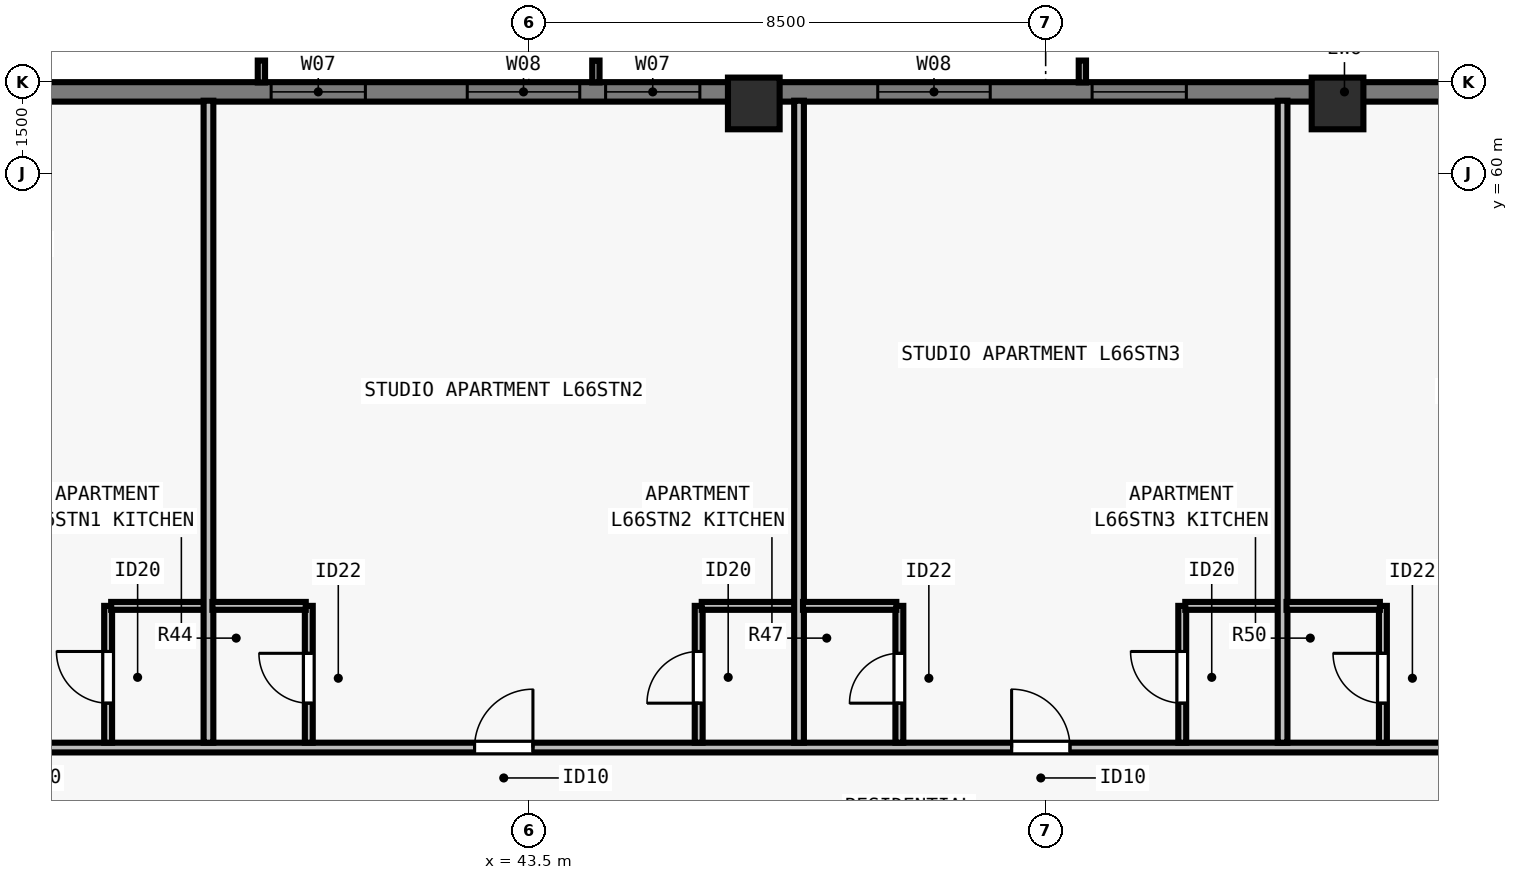
"""IFC4 building model, lengths in metres.
Left out: names, types, materials, properties, quantities, classifications, styles, units other than length and angle.
Written with IfcOpenShell. Run it as: python <this file> out.ifc"""

import sys

from ifc_helpers import new_model, si_unit, direction, frame, frame_2d, origin, origin_2d, place, context, subcontext, project, spatial, rectangle, extrude, element, fill, save


model = new_model("IFC4")
c1 = context("Model", 3, precision=1e-05, world=origin(), true_north=direction((0.0, 1.0)))
c2 = subcontext(c1, "Body", "Model", "MODEL_VIEW")
j1 = project(units=[si_unit("LENGTHUNIT", "METRE"), si_unit("PLANEANGLEUNIT", "RADIAN")], contexts=[c1])
p1 = place(None, origin())
s1 = spatial("IfcSite", under=j1, at=p1, CompositionType="ELEMENT")
p2 = place(p1, origin())
s2 = spatial("IfcBuilding", under=s1, at=p2, CompositionType="ELEMENT")
p3 = place(p2, frame((0.0, 0.0, 241.0)))
s3 = spatial("IfcBuildingStorey", under=s2, at=p3, CompositionType="ELEMENT", Elevation=241.0)
for number, where, z_axis, x_axis in (
    (1, (56.8, 61.15, 0.0), (0.0, 0.0, 1.0), (1.0, 0.0, 0.0)),
    (2, (47.2, 61.15, 0.0), (0.0, 0.0, 1.0), (1.0, 0.0, 0.0)),
):
    element("IfcColumn", number, at=place(p3, frame(where, z_axis=z_axis, x_axis=x_axis)), inside=s3, PredefinedType="COLUMN", context=c2, shape_type="SweptSolid", body=[
        extrude(rectangle(XDim=0.85, YDim=0.85, at=origin_2d()), origin(), (0.0, 0.0, 1.0), 3.5),
    ])
p4 = place(p3, frame((34.5, 61.34, 0.0), z_axis=(0.0, 0.0, 1.0), x_axis=(1.0, 0.0, 0.0)))
e3 = element("IfcWall", 3, at=p4, inside=s3, PredefinedType="SOLIDWALL", context=c2, shape_type="SweptSolid", body=[
    extrude(rectangle(XDim=34.702, YDim=0.32, at=frame_2d((17.351, 0.0))), origin(), (0.0, 0.0, 1.0), 3.29),
])
p5 = place(p4, frame((4.763, 0.0, 0.8)))
e4 = element("IfcOpeningElement", 4, at=p5, cuts=e3, PredefinedType="OPENING", context=c2, shape_type="SweptSolid", body=[
    extrude(rectangle(XDim=1.55, YDim=1.678, at=frame_2d((0.775, 0.839))), frame((0.0, 0.17, 0.0), z_axis=(0.0, -1.0, 0.0), x_axis=(1.0, 0.0, 0.0)), (0.0, 0.0, 1.0), 0.34),
])
p6 = place(p4, frame((7.988, 0.0, 0.8)))
e5 = element("IfcOpeningElement", 5, at=p6, cuts=e3, PredefinedType="OPENING", context=c2, shape_type="SweptSolid", body=[
    extrude(rectangle(XDim=1.85, YDim=1.678, at=frame_2d((0.925, 0.839))), frame((0.0, 0.17, 0.0), z_axis=(0.0, -1.0, 0.0), x_axis=(1.0, 0.0, 0.0)), (0.0, 0.0, 1.0), 0.34),
])
p7 = place(p4, frame((10.263, 0.0, 0.8)))
e6 = element("IfcOpeningElement", 6, at=p7, cuts=e3, PredefinedType="OPENING", context=c2, shape_type="SweptSolid", body=[
    extrude(rectangle(XDim=1.55, YDim=1.678, at=frame_2d((0.775, 0.839))), frame((0.0, 0.17, 0.0), z_axis=(0.0, -1.0, 0.0), x_axis=(1.0, 0.0, 0.0)), (0.0, 0.0, 1.0), 0.34),
])
p8 = place(p4, frame((14.738, 0.0, 0.8)))
e7 = element("IfcOpeningElement", 7, at=p8, cuts=e3, PredefinedType="OPENING", context=c2, shape_type="SweptSolid", body=[
    extrude(rectangle(XDim=1.85, YDim=1.678, at=frame_2d((0.925, 0.839))), frame((0.0, 0.17, 0.0), z_axis=(0.0, -1.0, 0.0), x_axis=(1.0, 0.0, 0.0)), (0.0, 0.0, 1.0), 0.34),
])
p9 = place(p4, frame((18.264, 0.0, 0.8)))
e8 = element("IfcOpeningElement", 8, at=p9, cuts=e3, PredefinedType="OPENING", context=c2, shape_type="SweptSolid", body=[
    extrude(rectangle(XDim=1.55, YDim=1.678, at=frame_2d((0.775, 0.839))), frame((0.0, 0.17, 0.0), z_axis=(0.0, -1.0, 0.0), x_axis=(1.0, 0.0, 0.0)), (0.0, 0.0, 1.0), 0.34),
])
p10 = place(p4, frame((25.014, 0.0, 0.8)))
e9 = element("IfcOpeningElement", 9, at=p10, cuts=e3, PredefinedType="OPENING", context=c2, shape_type="SweptSolid", body=[
    extrude(rectangle(XDim=1.55, YDim=1.678, at=frame_2d((0.775, 0.839))), frame((0.0, 0.17, 0.0), z_axis=(0.0, -1.0, 0.0), x_axis=(1.0, 0.0, 0.0)), (0.0, 0.0, 1.0), 0.34),
])
p11 = place(p4, frame((28.24, 0.0, 0.8)))
e10 = element("IfcOpeningElement", 10, at=p11, cuts=e3, PredefinedType="OPENING", context=c2, shape_type="SweptSolid", body=[
    extrude(rectangle(XDim=1.85, YDim=1.678, at=frame_2d((0.925, 0.839))), frame((0.0, 0.17, 0.0), z_axis=(0.0, -1.0, 0.0), x_axis=(1.0, 0.0, 0.0)), (0.0, 0.0, 1.0), 0.34),
])
p12 = place(p3, frame((29.805, 50.558, 0.0), z_axis=(0.0, 0.0, 1.0), x_axis=(1.0, 0.0, 0.0)))
e11 = element("IfcWall", 11, at=p12, inside=s3, PredefinedType="PARTITIONING", context=c2, shape_type="SweptSolid", body=[
    extrude(rectangle(XDim=44.39, YDim=0.16, at=frame_2d((22.195, 0.0))), origin(), (0.0, 0.0, 1.0), 2.958),
])
p13 = place(p12, frame((3.791, 0.0, 0.0)))
e12 = element("IfcOpeningElement", 12, at=p13, cuts=e11, PredefinedType="OPENING", context=c2, shape_type="SweptSolid", body=[
    extrude(rectangle(XDim=0.96, YDim=2.18, at=frame_2d((0.48, 1.09))), frame((0.0, 0.09, 0.0), z_axis=(0.0, -1.0, 0.0), x_axis=(1.0, 0.0, 0.0)), (0.0, 0.0, 1.0), 0.18),
])
p14 = place(p12, frame((12.803, 0.0, 0.0)))
e13 = element("IfcOpeningElement", 13, at=p14, cuts=e11, PredefinedType="OPENING", context=c2, shape_type="SweptSolid", body=[
    extrude(rectangle(XDim=0.96, YDim=2.18, at=frame_2d((0.48, 1.09))), frame((0.0, 0.09, 0.0), z_axis=(0.0, -1.0, 0.0), x_axis=(1.0, 0.0, 0.0)), (0.0, 0.0, 1.0), 0.18),
])
p15 = place(p12, frame((21.635, 0.0, 0.0)))
e14 = element("IfcOpeningElement", 14, at=p15, cuts=e11, PredefinedType="OPENING", context=c2, shape_type="SweptSolid", body=[
    extrude(rectangle(XDim=0.96, YDim=2.18, at=frame_2d((0.48, 1.09))), frame((0.0, 0.09, 0.0), z_axis=(0.0, -1.0, 0.0), x_axis=(1.0, 0.0, 0.0)), (0.0, 0.0, 1.0), 0.18),
])
p16 = place(p12, frame((30.467, 0.0, 0.0)))
e15 = element("IfcOpeningElement", 15, at=p16, cuts=e11, PredefinedType="OPENING", context=c2, shape_type="SweptSolid", body=[
    extrude(rectangle(XDim=0.96, YDim=2.18, at=frame_2d((0.48, 1.09))), frame((0.0, 0.09, 0.0), z_axis=(0.0, -1.0, 0.0), x_axis=(1.0, 0.0, 0.0)), (0.0, 0.0, 1.0), 0.18),
])
p17 = place(p12, frame((39.559, 0.0, 0.0)))
e16 = element("IfcOpeningElement", 16, at=p17, cuts=e11, PredefinedType="OPENING", context=c2, shape_type="SweptSolid", body=[
    extrude(rectangle(XDim=0.96, YDim=2.18, at=frame_2d((0.48, 1.09))), frame((0.0, 0.09, 0.0), z_axis=(0.0, -1.0, 0.0), x_axis=(1.0, 0.0, 0.0)), (0.0, 0.0, 1.0), 0.18),
])
p18 = place(p3, frame((36.582, 50.637, 0.0), z_axis=(0.0, 0.0, 1.0), x_axis=(0.0, 1.0, 0.0)))
e17 = element("IfcWall", 17, at=p18, inside=s3, PredefinedType="PLUMBINGWALL", context=c2, shape_type="SweptSolid", body=[
    extrude(rectangle(XDim=2.25, YDim=0.13, at=frame_2d((1.125, 0.0))), origin(), (0.0, 0.0, 1.0), 3.29),
])
p19 = place(p18, frame((0.65, 0.0, 0.0)))
e18 = element("IfcOpeningElement", 18, at=p19, cuts=e17, PredefinedType="OPENING", context=c2, shape_type="SweptSolid", body=[
    extrude(rectangle(XDim=0.85, YDim=2.1, at=frame_2d((0.425, 1.05))), frame((0.0, 0.075, 0.0), z_axis=(0.0, -1.0, 0.0), x_axis=(1.0, 0.0, 0.0)), (0.0, 0.0, 1.0), 0.15),
])
p20 = place(p3, frame((36.632, 52.887, 0.0), z_axis=(0.0, 0.0, 1.0), x_axis=(1.0, 0.0, 0.0)))
e19 = element("IfcWall", 19, at=p20, inside=s3, PredefinedType="PLUMBINGWALL", context=c2, shape_type="SweptSolid", body=[
    extrude(rectangle(XDim=1.6, YDim=0.13, at=frame_2d((0.8, 0.0))), origin(), (0.0, 0.0, 1.0), 3.29),
])
p21 = place(p3, frame((38.232, 50.637, 0.0), z_axis=(0.0, 0.0, 1.0), x_axis=(0.0, 1.0, 0.0)))
e20 = element("IfcWall", 20, at=p21, inside=s3, PredefinedType="PARTITIONING", context=c2, shape_type="SweptSolid", body=[
    extrude(rectangle(XDim=10.558, YDim=0.16, at=frame_2d((5.279, 0.0))), origin(), (0.0, 0.0, 1.0), 2.573),
])
p22 = place(p3, frame((39.882, 50.637, 0.0), z_axis=(0.0, 0.0, 1.0), x_axis=(0.0, 1.0, 0.0)))
e21 = element("IfcWall", 21, at=p22, inside=s3, PredefinedType="PLUMBINGWALL", context=c2, shape_type="SweptSolid", body=[
    extrude(rectangle(XDim=2.25, YDim=0.13, at=frame_2d((1.125, 0.0))), origin(), (0.0, 0.0, 1.0), 3.29),
])
p23 = place(p22, frame((0.65, 0.0, 0.0)))
e22 = element("IfcOpeningElement", 22, at=p23, cuts=e21, PredefinedType="OPENING", context=c2, shape_type="SweptSolid", body=[
    extrude(rectangle(XDim=0.82, YDim=2.1, at=frame_2d((0.41, 1.05))), frame((0.0, 0.075, 0.0), z_axis=(0.0, -1.0, 0.0), x_axis=(1.0, 0.0, 0.0)), (0.0, 0.0, 1.0), 0.15),
])
p24 = place(p3, frame((38.297, 52.887, 0.0), z_axis=(0.0, 0.0, 1.0), x_axis=(1.0, 0.0, 0.0)))
e23 = element("IfcWall", 23, at=p24, inside=s3, PredefinedType="PLUMBINGWALL", context=c2, shape_type="SweptSolid", body=[
    extrude(rectangle(XDim=1.535, YDim=0.13, at=frame_2d((0.768, 0.0))), origin(), (0.0, 0.0, 1.0), 3.29),
])
p25 = place(p3, frame((46.294, 50.637, 0.0), z_axis=(0.0, 0.0, 1.0), x_axis=(0.0, 1.0, 0.0)))
e24 = element("IfcWall", 24, at=p25, inside=s3, PredefinedType="PLUMBINGWALL", context=c2, shape_type="SweptSolid", body=[
    extrude(rectangle(XDim=2.25, YDim=0.13, at=frame_2d((1.125, 0.0))), origin(), (0.0, 0.0, 1.0), 3.29),
])
p26 = place(p25, frame((0.65, 0.0, 0.0)))
e25 = element("IfcOpeningElement", 25, at=p26, cuts=e24, PredefinedType="OPENING", context=c2, shape_type="SweptSolid", body=[
    extrude(rectangle(XDim=0.85, YDim=2.1, at=frame_2d((0.425, 1.05))), frame((0.0, 0.075, 0.0), z_axis=(0.0, -1.0, 0.0), x_axis=(1.0, 0.0, 0.0)), (0.0, 0.0, 1.0), 0.15),
])
p27 = place(p3, frame((46.344, 52.887, 0.0), z_axis=(0.0, 0.0, 1.0), x_axis=(1.0, 0.0, 0.0)))
e26 = element("IfcWall", 26, at=p27, inside=s3, PredefinedType="PLUMBINGWALL", context=c2, shape_type="SweptSolid", body=[
    extrude(rectangle(XDim=1.6, YDim=0.13, at=frame_2d((0.8, 0.0))), origin(), (0.0, 0.0, 1.0), 3.29),
])
p28 = place(p3, frame((47.944, 50.637, 0.0), z_axis=(0.0, 0.0, 1.0), x_axis=(0.0, 1.0, 0.0)))
e27 = element("IfcWall", 27, at=p28, inside=s3, PredefinedType="PARTITIONING", context=c2, shape_type="SweptSolid", body=[
    extrude(rectangle(XDim=10.558, YDim=0.16, at=frame_2d((5.279, 0.0))), origin(), (0.0, 0.0, 1.0), 3.29),
])
p29 = place(p3, frame((49.594, 50.637, 0.0), z_axis=(0.0, 0.0, 1.0), x_axis=(0.0, 1.0, 0.0)))
e28 = element("IfcWall", 28, at=p29, inside=s3, PredefinedType="PLUMBINGWALL", context=c2, shape_type="SweptSolid", body=[
    extrude(rectangle(XDim=2.25, YDim=0.13, at=frame_2d((1.125, 0.0))), origin(), (0.0, 0.0, 1.0), 2.958),
])
p30 = place(p29, frame((0.65, 0.0, 0.0)))
e29 = element("IfcOpeningElement", 29, at=p30, cuts=e28, PredefinedType="OPENING", context=c2, shape_type="SweptSolid", body=[
    extrude(rectangle(XDim=0.82, YDim=2.1, at=frame_2d((0.41, 1.05))), frame((0.0, 0.075, 0.0), z_axis=(0.0, -1.0, 0.0), x_axis=(1.0, 0.0, 0.0)), (0.0, 0.0, 1.0), 0.15),
])
p31 = place(p3, frame((48.009, 52.887, 0.0), z_axis=(0.0, 0.0, 1.0), x_axis=(1.0, 0.0, 0.0)))
e30 = element("IfcWall", 30, at=p31, inside=s3, PredefinedType="PLUMBINGWALL", context=c2, shape_type="SweptSolid", body=[
    extrude(rectangle(XDim=1.535, YDim=0.13, at=frame_2d((0.768, 0.0))), origin(), (0.0, 0.0, 1.0), 3.29),
])
p32 = place(p3, frame((54.246, 50.637, 0.0), z_axis=(0.0, 0.0, 1.0), x_axis=(0.0, 1.0, 0.0)))
e31 = element("IfcWall", 31, at=p32, inside=s3, PredefinedType="PLUMBINGWALL", context=c2, shape_type="SweptSolid", body=[
    extrude(rectangle(XDim=2.25, YDim=0.13, at=frame_2d((1.125, 0.0))), origin(), (0.0, 0.0, 1.0), 3.29),
])
p33 = place(p32, frame((0.65, 0.0, 0.0)))
e32 = element("IfcOpeningElement", 32, at=p33, cuts=e31, PredefinedType="OPENING", context=c2, shape_type="SweptSolid", body=[
    extrude(rectangle(XDim=0.85, YDim=2.1, at=frame_2d((0.425, 1.05))), frame((0.0, 0.075, 0.0), z_axis=(0.0, -1.0, 0.0), x_axis=(1.0, 0.0, 0.0)), (0.0, 0.0, 1.0), 0.15),
])
p34 = place(p3, frame((54.296, 52.887, 0.0), z_axis=(0.0, 0.0, 1.0), x_axis=(1.0, 0.0, 0.0)))
e33 = element("IfcWall", 33, at=p34, inside=s3, PredefinedType="PLUMBINGWALL", context=c2, shape_type="SweptSolid", body=[
    extrude(rectangle(XDim=1.6, YDim=0.13, at=frame_2d((0.8, 0.0))), origin(), (0.0, 0.0, 1.0), 3.29),
])
p35 = place(p3, frame((55.896, 50.637, 0.0), z_axis=(0.0, 0.0, 1.0), x_axis=(0.0, 1.0, 0.0)))
e34 = element("IfcWall", 34, at=p35, inside=s3, PredefinedType="PARTITIONING", context=c2, shape_type="SweptSolid", body=[
    extrude(rectangle(XDim=10.558, YDim=0.16, at=frame_2d((5.279, 0.0))), origin(), (0.0, 0.0, 1.0), 2.958),
])
p36 = place(p3, frame((57.546, 50.637, 0.0), z_axis=(0.0, 0.0, 1.0), x_axis=(0.0, 1.0, 0.0)))
e35 = element("IfcWall", 35, at=p36, inside=s3, PredefinedType="PLUMBINGWALL", context=c2, shape_type="SweptSolid", body=[
    extrude(rectangle(XDim=2.25, YDim=0.13, at=frame_2d((1.125, 0.0))), origin(), (0.0, 0.0, 1.0), 3.29),
])
p37 = place(p36, frame((0.65, 0.0, 0.0)))
e36 = element("IfcOpeningElement", 36, at=p37, cuts=e35, PredefinedType="OPENING", context=c2, shape_type="SweptSolid", body=[
    extrude(rectangle(XDim=0.82, YDim=2.1, at=frame_2d((0.41, 1.05))), frame((0.0, 0.075, 0.0), z_axis=(0.0, -1.0, 0.0), x_axis=(1.0, 0.0, 0.0)), (0.0, 0.0, 1.0), 0.15),
])
p38 = place(p3, frame((55.961, 52.887, 0.0), z_axis=(0.0, 0.0, 1.0), x_axis=(1.0, 0.0, 0.0)))
e37 = element("IfcWall", 37, at=p38, inside=s3, PredefinedType="PLUMBINGWALL", context=c2, shape_type="SweptSolid", body=[
    extrude(rectangle(XDim=1.535, YDim=0.13, at=frame_2d((0.768, 0.0))), origin(), (0.0, 0.0, 1.0), 3.29),
])
p39 = place(p5, origin())
e38 = element("IfcWindow", 38, at=p39, inside=s3, PartitioningType="SINGLE_PANEL", PredefinedType="WINDOW", context=c2, shape_type="SweptSolid", body=[
    extrude(rectangle(XDim=1.55, YDim=1.678, at=frame_2d((0.775, 0.839))), frame((0.0, -0.05, 0.0), z_axis=(0.0, -1.0, 0.0), x_axis=(1.0, 0.0, 0.0)), (0.0, 0.0, 1.0), 0.06),
])
fill(e4, e38)
p40 = place(p6, origin())
e39 = element("IfcWindow", 39, at=p40, inside=s3, PartitioningType="SINGLE_PANEL", PredefinedType="WINDOW", context=c2, shape_type="SweptSolid", body=[
    extrude(rectangle(XDim=1.85, YDim=1.678, at=frame_2d((0.925, 0.839))), frame((0.0, -0.05, 0.0), z_axis=(0.0, -1.0, 0.0), x_axis=(1.0, 0.0, 0.0)), (0.0, 0.0, 1.0), 0.06),
])
fill(e5, e39)
p41 = place(p7, origin())
e40 = element("IfcWindow", 40, at=p41, inside=s3, PartitioningType="SINGLE_PANEL", PredefinedType="WINDOW", context=c2, shape_type="SweptSolid", body=[
    extrude(rectangle(XDim=1.55, YDim=1.678, at=frame_2d((0.775, 0.839))), frame((0.0, -0.05, 0.0), z_axis=(0.0, -1.0, 0.0), x_axis=(1.0, 0.0, 0.0)), (0.0, 0.0, 1.0), 0.06),
])
fill(e6, e40)
p42 = place(p8, origin())
e41 = element("IfcWindow", 41, at=p42, inside=s3, PartitioningType="SINGLE_PANEL", PredefinedType="WINDOW", context=c2, shape_type="SweptSolid", body=[
    extrude(rectangle(XDim=1.85, YDim=1.678, at=frame_2d((0.925, 0.839))), frame((0.0, -0.05, 0.0), z_axis=(0.0, -1.0, 0.0), x_axis=(1.0, 0.0, 0.0)), (0.0, 0.0, 1.0), 0.06),
])
fill(e7, e41)
p43 = place(p9, origin())
e42 = element("IfcWindow", 42, at=p43, inside=s3, PartitioningType="SINGLE_PANEL", PredefinedType="WINDOW", context=c2, shape_type="SweptSolid", body=[
    extrude(rectangle(XDim=1.55, YDim=1.678, at=frame_2d((0.775, 0.839))), frame((0.0, -0.05, 0.0), z_axis=(0.0, -1.0, 0.0), x_axis=(1.0, 0.0, 0.0)), (0.0, 0.0, 1.0), 0.06),
])
fill(e8, e42)
p44 = place(p19, origin())
e43 = element("IfcDoor", 43, at=p44, inside=s3, OperationType="SINGLE_SWING_RIGHT", PredefinedType="DOOR", context=c2, shape_type="SweptSolid", body=[
    extrude(rectangle(XDim=0.85, YDim=2.1, at=frame_2d((0.425, 1.05))), frame((0.0, 0.025, 0.0), z_axis=(0.0, -1.0, 0.0), x_axis=(1.0, 0.0, 0.0)), (0.0, 0.0, 1.0), 0.05),
])
fill(e18, e43)
p45 = place(p23, origin())
e44 = element("IfcDoor", 44, at=p45, inside=s3, OperationType="SINGLE_SWING_RIGHT", PredefinedType="DOOR", context=c2, shape_type="SweptSolid", body=[
    extrude(rectangle(XDim=0.82, YDim=2.1, at=frame_2d((0.41, 1.05))), frame((0.0, 0.025, 0.0), z_axis=(0.0, -1.0, 0.0), x_axis=(1.0, 0.0, 0.0)), (0.0, 0.0, 1.0), 0.05),
])
fill(e22, e44)
p46 = place(p26, origin())
e45 = element("IfcDoor", 45, at=p46, inside=s3, OperationType="SINGLE_SWING_LEFT", PredefinedType="DOOR", context=c2, shape_type="SweptSolid", body=[
    extrude(rectangle(XDim=0.85, YDim=2.1, at=frame_2d((0.425, 1.05))), frame((0.0, 0.025, 0.0), z_axis=(0.0, -1.0, 0.0), x_axis=(1.0, 0.0, 0.0)), (0.0, 0.0, 1.0), 0.05),
])
fill(e25, e45)
p47 = place(p14, origin())
e46 = element("IfcDoor", 46, at=p47, inside=s3, OperationType="SINGLE_SWING_RIGHT", PredefinedType="DOOR", context=c2, shape_type="SweptSolid", body=[
    extrude(rectangle(XDim=0.96, YDim=2.18, at=frame_2d((0.48, 1.09))), frame((0.0, 0.025, 0.0), z_axis=(0.0, -1.0, 0.0), x_axis=(1.0, 0.0, 0.0)), (0.0, 0.0, 1.0), 0.05),
])
fill(e13, e46)
p48 = place(p30, origin())
e47 = element("IfcDoor", 47, at=p48, inside=s3, OperationType="SINGLE_SWING_LEFT", PredefinedType="DOOR", context=c2, shape_type="SweptSolid", body=[
    extrude(rectangle(XDim=0.82, YDim=2.1, at=frame_2d((0.41, 1.05))), frame((0.0, 0.025, 0.0), z_axis=(0.0, -1.0, 0.0), x_axis=(1.0, 0.0, 0.0)), (0.0, 0.0, 1.0), 0.05),
])
fill(e29, e47)
p49 = place(p33, origin())
e48 = element("IfcDoor", 48, at=p49, inside=s3, OperationType="SINGLE_SWING_RIGHT", PredefinedType="DOOR", context=c2, shape_type="SweptSolid", body=[
    extrude(rectangle(XDim=0.85, YDim=2.1, at=frame_2d((0.425, 1.05))), frame((0.0, 0.025, 0.0), z_axis=(0.0, -1.0, 0.0), x_axis=(1.0, 0.0, 0.0)), (0.0, 0.0, 1.0), 0.05),
])
fill(e32, e48)
p50 = place(p15, origin())
e49 = element("IfcDoor", 49, at=p50, inside=s3, OperationType="SINGLE_SWING_LEFT", PredefinedType="DOOR", context=c2, shape_type="SweptSolid", body=[
    extrude(rectangle(XDim=0.96, YDim=2.18, at=frame_2d((0.48, 1.09))), frame((0.0, 0.025, 0.0), z_axis=(0.0, -1.0, 0.0), x_axis=(1.0, 0.0, 0.0)), (0.0, 0.0, 1.0), 0.05),
])
fill(e14, e49)
p51 = place(p37, origin())
e50 = element("IfcDoor", 50, at=p51, inside=s3, OperationType="SINGLE_SWING_RIGHT", PredefinedType="DOOR", context=c2, shape_type="SweptSolid", body=[
    extrude(rectangle(XDim=0.82, YDim=2.1, at=frame_2d((0.41, 1.05))), frame((0.0, 0.025, 0.0), z_axis=(0.0, -1.0, 0.0), x_axis=(1.0, 0.0, 0.0)), (0.0, 0.0, 1.0), 0.05),
])
fill(e36, e50)
save(model, sys.argv[1])
